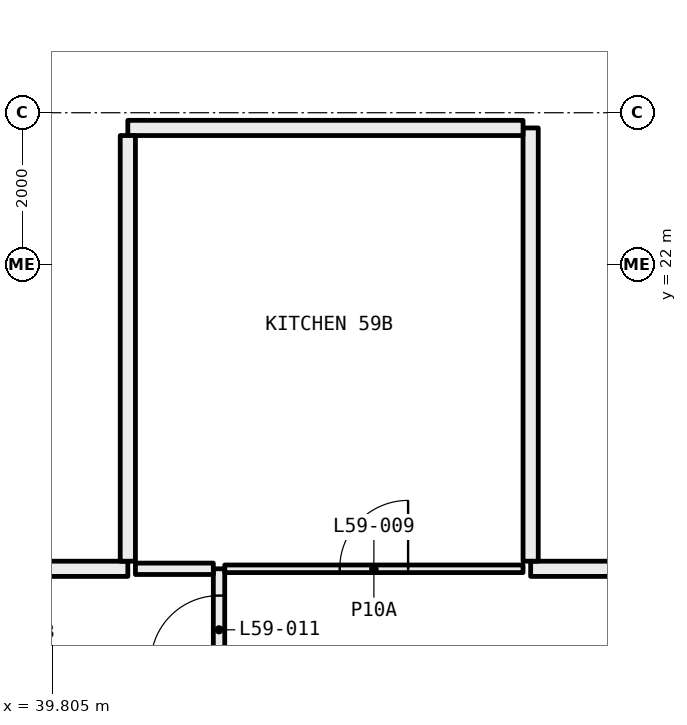
"""IFC4 building model, lengths in metres.
Left out: names, types, materials, properties, quantities, classifications, styles, units other than length and angle.
Written with IfcOpenShell. Run it as: python <this file> out.ifc"""

import sys

from ifc_helpers import new_model, si_unit, direction, frame, frame_2d, origin, place, context, subcontext, project, spatial, rectangle, extrude, element, fill, save


model = new_model("IFC4")
c1 = context("Model", 3, precision=1e-05, world=origin(), true_north=direction((0.0, 1.0)))
c2 = subcontext(c1, "Body", "Model", "MODEL_VIEW")
j1 = project(units=[si_unit("LENGTHUNIT", "METRE"), si_unit("PLANEANGLEUNIT", "RADIAN")], contexts=[c1])
p1 = place(None, origin())
s1 = spatial("IfcSite", under=j1, at=p1, CompositionType="ELEMENT")
p2 = place(p1, origin())
s2 = spatial("IfcBuilding", under=s1, at=p2, CompositionType="ELEMENT")
p3 = place(p2, frame((0.0, 0.0, 221.4)))
s3 = spatial("IfcBuildingStorey", under=s2, at=p3, CompositionType="ELEMENT", Elevation=221.4)
p4 = place(p3, frame((42.0, 16.395, 0.0), z_axis=(0.0, 0.0, 1.0), x_axis=(0.0, 1.0, 0.0)))
e1 = element("IfcWall", 1, at=p4, inside=s3, PredefinedType="PARTITIONING", context=c2, shape_type="SweptSolid", body=[
    extrude(rectangle(XDim=1.605, YDim=0.15, at=frame_2d((0.802, 0.0))), origin(), (0.0, 0.0, 1.0), 3.05),
])
p5 = place(p4, frame((0.353, 0.0, 0.0)))
e2 = element("IfcOpeningElement", 2, at=p5, cuts=e1, PredefinedType="OPENING", context=c2, shape_type="SweptSolid", body=[
    extrude(rectangle(XDim=0.9, YDim=2.1, at=frame_2d((0.45, 1.05))), frame((0.0, 0.085, 0.0), z_axis=(0.0, -1.0, 0.0), x_axis=(1.0, 0.0, 0.0)), (0.0, 0.0, 1.0), 0.17),
])
p6 = place(p3, frame((41.925, 18.0, 0.0), z_axis=(0.0, 0.0, 1.0), x_axis=(-1.0, 0.0, 0.0)))
e3 = element("IfcWall", 3, at=p6, inside=s3, PredefinedType="PARTITIONING", context=c2, shape_type="SweptSolid", body=[
    extrude(rectangle(XDim=1.025, YDim=0.15, at=frame_2d((0.513, 0.0))), origin(), (0.0, 0.0, 1.0), 3.05),
])
p7 = place(p3, frame((40.8, 18.0, 0.0), z_axis=(0.0, 0.0, 1.0), x_axis=(-1.0, 0.0, 0.0)))
e4 = element("IfcWall", 4, at=p7, inside=s3, PredefinedType="PARTITIONING", context=c2, shape_type="SweptSolid", body=[
    extrude(rectangle(XDim=2.3, YDim=0.2, at=frame_2d((1.15, 0.0))), origin(), (0.0, 0.0, 1.0), 3.05),
])
p8 = place(p3, frame((46.0, 18.0, 0.0), z_axis=(0.0, 0.0, 1.0), x_axis=(-1.0, 0.0, 0.0)))
e5 = element("IfcWall", 5, at=p8, inside=s3, PredefinedType="PARTITIONING", context=c2, shape_type="SweptSolid", body=[
    extrude(rectangle(XDim=3.925, YDim=0.1, at=frame_2d((1.962, 0.0))), origin(), (0.0, 0.0, 1.0), 3.05),
])
p9 = place(p8, frame((1.512, 0.0, 0.0)))
e6 = element("IfcOpeningElement", 6, at=p9, cuts=e5, PredefinedType="OPENING", context=c2, shape_type="SweptSolid", body=[
    extrude(rectangle(XDim=0.9, YDim=2.1, at=frame_2d((0.45, 1.05))), frame((0.0, 0.06, 0.0), z_axis=(0.0, -1.0, 0.0), x_axis=(1.0, 0.0, 0.0)), (0.0, 0.0, 1.0), 0.12),
])
p10 = place(p3, frame((48.0, 18.0, 0.0), z_axis=(0.0, 0.0, 1.0), x_axis=(-1.0, 0.0, 0.0)))
e7 = element("IfcWall", 7, at=p10, inside=s3, PredefinedType="PARTITIONING", context=c2, shape_type="SweptSolid", body=[
    extrude(rectangle(XDim=1.9, YDim=0.2, at=frame_2d((0.95, 0.0))), origin(), (0.0, 0.0, 1.0), 3.05),
])
p11 = place(p3, frame((46.1, 18.1, 0.0), z_axis=(0.0, 0.0, 1.0), x_axis=(0.0, 1.0, 0.0)))
e8 = element("IfcWall", 8, at=p11, inside=s3, PredefinedType="PARTITIONING", context=c2, shape_type="SweptSolid", body=[
    extrude(rectangle(XDim=5.7, YDim=0.2, at=frame_2d((2.85, 0.0))), origin(), (0.0, 0.0, 1.0), 3.05),
])
p12 = place(p3, frame((46.0, 23.8, 0.0), z_axis=(0.0, 0.0, 1.0), x_axis=(-1.0, 0.0, 0.0)))
e9 = element("IfcWall", 9, at=p12, inside=s3, PredefinedType="PARTITIONING", context=c2, shape_type="SweptSolid", body=[
    extrude(rectangle(XDim=5.2, YDim=0.2, at=frame_2d((2.6, 0.0))), origin(), (0.0, 0.0, 1.0), 3.05),
])
p13 = place(p3, frame((40.8, 23.7, 0.0), z_axis=(0.0, 0.0, 1.0), x_axis=(0.0, -1.0, 0.0)))
e10 = element("IfcWall", 10, at=p13, inside=s3, PredefinedType="PARTITIONING", context=c2, shape_type="SweptSolid", body=[
    extrude(rectangle(XDim=5.6, YDim=0.2, at=frame_2d((2.8, 0.0))), origin(), (0.0, 0.0, 1.0), 3.05),
])
p14 = place(p9, frame((0.9, 0.0, 0.0), x_axis=(-1.0, 0.0, 0.0)))
e11 = element("IfcDoor", 11, at=p14, inside=s3, OperationType="SINGLE_SWING_LEFT", PredefinedType="DOOR", context=c2, shape_type="SweptSolid", body=[
    extrude(rectangle(XDim=0.9, YDim=2.1, at=frame_2d((0.45, 1.05))), frame((0.0, 0.025, 0.0), z_axis=(0.0, -1.0, 0.0), x_axis=(1.0, 0.0, 0.0)), (0.0, 0.0, 1.0), 0.05),
])
fill(e6, e11)
p15 = place(p5, origin())
e12 = element("IfcDoor", 12, at=p15, inside=s3, OperationType="SINGLE_SWING_RIGHT", PredefinedType="DOOR", context=c2, shape_type="SweptSolid", body=[
    extrude(rectangle(XDim=0.9, YDim=2.1, at=frame_2d((0.45, 1.05))), frame((0.0, 0.025, 0.0), z_axis=(0.0, -1.0, 0.0), x_axis=(1.0, 0.0, 0.0)), (0.0, 0.0, 1.0), 0.05),
])
fill(e2, e12)
save(model, sys.argv[1])
